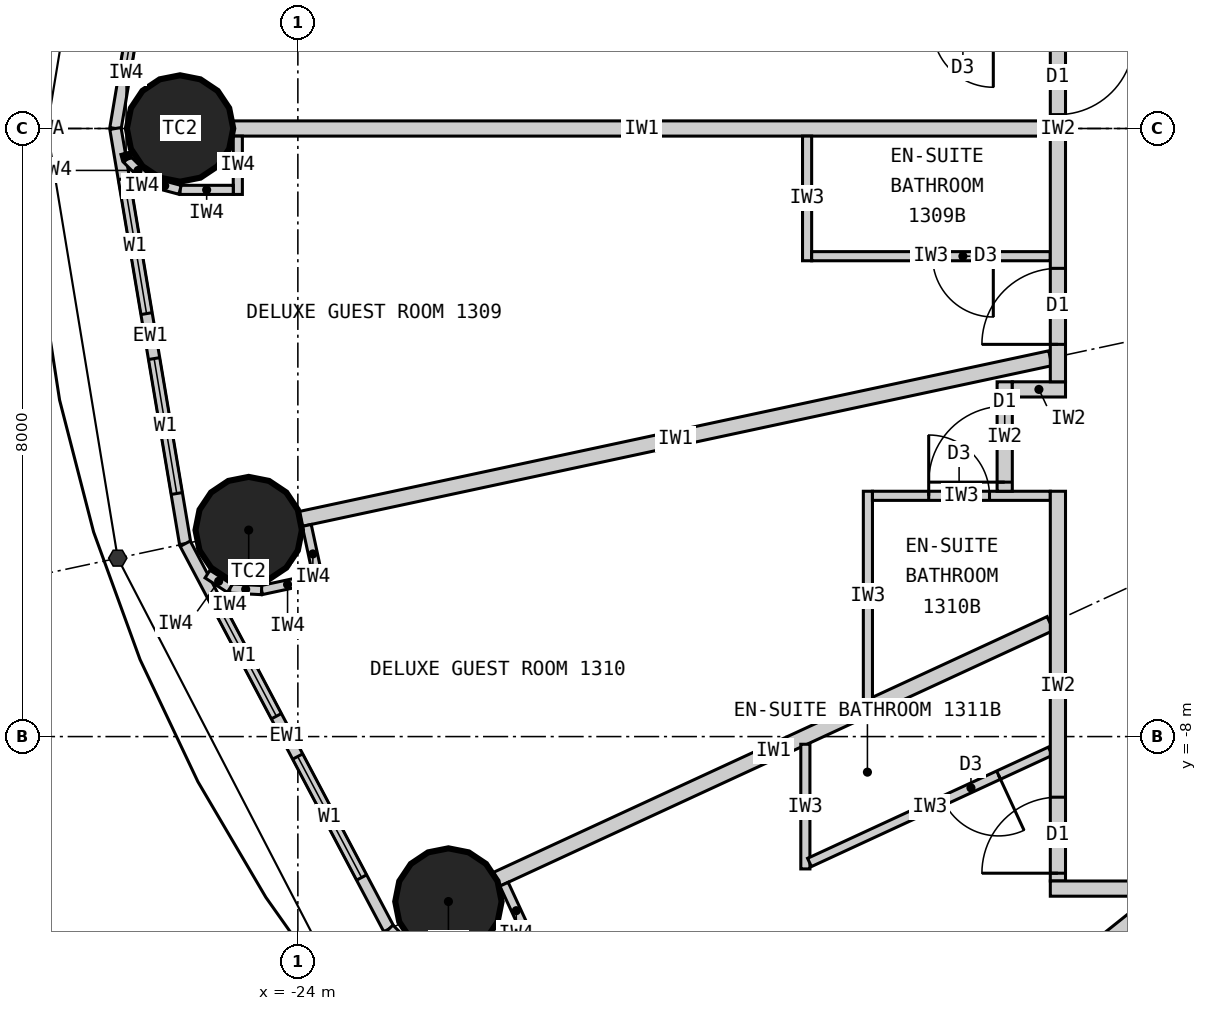
"""IFC4 building model, lengths in metres.
Left out: names, types, materials, properties, quantities, classifications, styles, units other than length and angle.
Written with IfcOpenShell. Run it as: python <this file> out.ifc"""

import sys

from ifc_helpers import new_model, si_unit, direction, frame, frame_2d, origin, origin_2d, place, context, subcontext, project, spatial, rectangle, circle, extrude, element, fill, save


model = new_model("IFC4")
c1 = context("Model", 3, precision=1e-05, world=origin(), true_north=direction((0.0, 1.0)))
c2 = subcontext(c1, "Body", "Model", "MODEL_VIEW")
j1 = project(units=[si_unit("LENGTHUNIT", "METRE"), si_unit("PLANEANGLEUNIT", "RADIAN")], contexts=[c1])
p1 = place(None, origin())
s1 = spatial("IfcSite", under=j1, at=p1, CompositionType="ELEMENT")
p2 = place(p1, origin())
s2 = spatial("IfcBuilding", under=s1, at=p2, CompositionType="ELEMENT")
p3 = place(p2, frame((0.0, 0.0, 57.3)))
s3 = spatial("IfcBuildingStorey", under=s2, at=p3, CompositionType="ELEMENT", Elevation=57.3)
for number, where, z_axis, x_axis in (
    (1, (-25.55, 0.0, 0.0), (0.0, 0.0, 1.0), (1.0, 0.0, 0.0)),
    (2, (-24.647, -5.283, 0.0), (0.0, 0.0, 1.0), (1.0, 0.0, 0.0)),
    (3, (-22.019, -10.17, 0.0), (0.0, 0.0, 1.0), (1.0, 0.0, 0.0)),
):
    element("IfcColumn", number, at=place(p3, frame(where, z_axis=z_axis, x_axis=x_axis)), inside=s3, PredefinedType="COLUMN", context=c2, shape_type="SweptSolid", body=[
        extrude(circle(Radius=0.7, at=origin_2d()), origin(), (0.0, 0.0, 1.0), 3.3),
    ])
p4 = place(p3, frame((-25.482, 5.462, 0.0), z_axis=(0.0, 0.0, 1.0), x_axis=(-0.165642551694, -0.986185857264, 0.0)))
e4 = element("IfcWall", 4, at=p4, inside=s3, PredefinedType="ELEMENTEDWALL", context=c2, shape_type="SweptSolid", body=[
    extrude(rectangle(XDim=5.539, YDim=0.15, at=frame_2d((2.77, 0.0))), origin(), (0.0, 0.0, 1.0), 3.12),
])
p5 = place(p4, frame((0.669, 0.0, 0.9)))
e5 = element("IfcOpeningElement", 5, at=p5, cuts=e4, PredefinedType="OPENING", context=c2, shape_type="SweptSolid", body=[
    extrude(rectangle(XDim=1.8, YDim=1.9, at=frame_2d((0.9, 0.95))), frame((0.0, 0.085, 0.0), z_axis=(0.0, -1.0, 0.0), x_axis=(1.0, 0.0, 0.0)), (0.0, 0.0, 1.0), 0.17),
])
p6 = place(p4, frame((3.07, 0.0, 0.9)))
e6 = element("IfcOpeningElement", 6, at=p6, cuts=e4, PredefinedType="OPENING", context=c2, shape_type="SweptSolid", body=[
    extrude(rectangle(XDim=1.8, YDim=1.9, at=frame_2d((0.9, 0.95))), frame((0.0, 0.085, 0.0), z_axis=(0.0, -1.0, 0.0), x_axis=(1.0, 0.0, 0.0)), (0.0, 0.0, 1.0), 0.17),
])
p7 = place(p3, frame((-26.4, 0.0, 0.0), z_axis=(0.0, 0.0, 1.0), x_axis=(0.165642551694, -0.986185857264, 0.0)))
e7 = element("IfcWall", 7, at=p7, inside=s3, PredefinedType="ELEMENTEDWALL", context=c2, shape_type="SweptSolid", body=[
    extrude(rectangle(XDim=5.539, YDim=0.15, at=frame_2d((2.77, 0.0))), origin(), (0.0, 0.0, 1.0), 3.12),
])
p8 = place(p7, frame((0.669, 0.0, 0.9)))
e8 = element("IfcOpeningElement", 8, at=p8, cuts=e7, PredefinedType="OPENING", context=c2, shape_type="SweptSolid", body=[
    extrude(rectangle(XDim=1.8, YDim=1.9, at=frame_2d((0.9, 0.95))), frame((0.0, 0.085, 0.0), z_axis=(0.0, -1.0, 0.0), x_axis=(1.0, 0.0, 0.0)), (0.0, 0.0, 1.0), 0.17),
])
p9 = place(p7, frame((3.07, 0.0, 0.9)))
e9 = element("IfcOpeningElement", 9, at=p9, cuts=e7, PredefinedType="OPENING", context=c2, shape_type="SweptSolid", body=[
    extrude(rectangle(XDim=1.8, YDim=1.9, at=frame_2d((0.9, 0.95))), frame((0.0, 0.085, 0.0), z_axis=(0.0, -1.0, 0.0), x_axis=(1.0, 0.0, 0.0)), (0.0, 0.0, 1.0), 0.17),
])
p10 = place(p3, frame((-25.482, -5.462, 0.0), z_axis=(0.0, 0.0, 1.0), x_axis=(0.467296867008, -0.884100468321, 0.0)))
e10 = element("IfcWall", 10, at=p10, inside=s3, PredefinedType="ELEMENTEDWALL", context=c2, shape_type="SweptSolid", body=[
    extrude(rectangle(XDim=5.734, YDim=0.15, at=frame_2d((2.867, 0.0))), origin(), (0.0, 0.0, 1.0), 3.12),
])
p11 = place(p10, frame((0.767, 0.0, 0.9)))
e11 = element("IfcOpeningElement", 11, at=p11, cuts=e10, PredefinedType="OPENING", context=c2, shape_type="SweptSolid", body=[
    extrude(rectangle(XDim=1.8, YDim=1.9, at=frame_2d((0.9, 0.95))), frame((0.0, 0.085, 0.0), z_axis=(0.0, -1.0, 0.0), x_axis=(1.0, 0.0, 0.0)), (0.0, 0.0, 1.0), 0.17),
])
p12 = place(p10, frame((3.167, 0.0, 0.9)))
e12 = element("IfcOpeningElement", 12, at=p12, cuts=e10, PredefinedType="OPENING", context=c2, shape_type="SweptSolid", body=[
    extrude(rectangle(XDim=1.8, YDim=1.9, at=frame_2d((0.9, 0.95))), frame((0.0, 0.085, 0.0), z_axis=(0.0, -1.0, 0.0), x_axis=(1.0, 0.0, 0.0)), (0.0, 0.0, 1.0), 0.17),
])
p13 = place(p3, frame((-22.803, -10.532, 0.0), z_axis=(0.0, 0.0, 1.0), x_axis=(0.699602905915, -0.714531856557, 0.0)))
e13 = element("IfcWall", 13, at=p13, inside=s3, PredefinedType="ELEMENTEDWALL", context=c2, shape_type="SweptSolid", body=[
    extrude(rectangle(XDim=6.051, YDim=0.15, at=frame_2d((3.025, 0.0))), origin(), (0.0, 0.0, 1.0), 3.12),
])
p14 = place(p13, frame((0.926, 0.0, 0.9)))
e14 = element("IfcOpeningElement", 14, at=p14, cuts=e13, PredefinedType="OPENING", context=c2, shape_type="SweptSolid", body=[
    extrude(rectangle(XDim=1.8, YDim=1.9, at=frame_2d((0.9, 0.95))), frame((0.0, 0.085, 0.0), z_axis=(0.0, -1.0, 0.0), x_axis=(1.0, 0.0, 0.0)), (0.0, 0.0, 1.0), 0.17),
])
p15 = place(p13, frame((3.325, 0.0, 0.9)))
e15 = element("IfcOpeningElement", 15, at=p15, cuts=e13, PredefinedType="OPENING", context=c2, shape_type="SweptSolid", body=[
    extrude(rectangle(XDim=1.8, YDim=1.9, at=frame_2d((0.9, 0.95))), frame((0.0, 0.085, 0.0), z_axis=(0.0, -1.0, 0.0), x_axis=(1.0, 0.0, 0.0)), (0.0, 0.0, 1.0), 0.17),
])
p16 = place(p3, frame((-14.1, 0.0, 0.0), z_axis=(0.0, 0.0, 1.0), x_axis=(-1.0, 0.0, 0.0)))
e16 = element("IfcWall", 16, at=p16, inside=s3, PredefinedType="PARTITIONING", context=c2, shape_type="SweptSolid", body=[
    extrude(rectangle(XDim=10.75, YDim=0.2, at=frame_2d((5.375, 0.0))), origin(), (0.0, 0.0, 1.0), 2.27),
])
p17 = place(p3, frame((-14.1, -3.022, 0.0), z_axis=(0.0, 0.0, 1.0), x_axis=(-0.977790014929, -0.209586943072, 0.0)))
e17 = element("IfcWall", 17, at=p17, inside=s3, PredefinedType="PARTITIONING", context=c2, shape_type="SweptSolid", body=[
    extrude(rectangle(XDim=10.087, YDim=0.2, at=frame_2d((5.043, 0.0))), origin(), (0.0, 0.0, 1.0), 2.32),
])
p18 = place(p3, frame((-14.1, -6.512, 0.0), z_axis=(0.0, 0.0, 1.0), x_axis=(-0.907832871056, -0.419332181247, 0.0)))
e18 = element("IfcWall", 18, at=p18, inside=s3, PredefinedType="PARTITIONING", context=c2, shape_type="SweptSolid", body=[
    extrude(rectangle(XDim=8.023, YDim=0.2, at=frame_2d((4.011, 0.0))), origin(), (0.0, 0.0, 1.0), 2.32),
])
p19 = place(p3, frame((-12.625, -10.1, 0.0), z_axis=(0.0, 0.0, 1.0), x_axis=(-0.780892451574, -0.624665493744, 0.0)))
e19 = element("IfcWall", 19, at=p19, inside=s3, PredefinedType="PARTITIONING", context=c2, shape_type="SweptSolid", body=[
    extrude(rectangle(XDim=6.045, YDim=0.2, at=frame_2d((3.022, 0.0))), origin(), (0.0, 0.0, 1.0), 2.32),
])
p20 = place(p3, frame((-17.3, -0.1, 0.0), z_axis=(0.0, 0.0, 1.0), x_axis=(0.0, -1.0, 0.0)))
e20 = element("IfcWall", 20, at=p20, inside=s3, PredefinedType="PARTITIONING", context=c2, shape_type="SweptSolid", body=[
    extrude(rectangle(XDim=1.64, YDim=0.12, at=frame_2d((0.82, 0.0))), origin(), (0.0, 0.0, 1.0), 3.12),
])
p21 = place(p3, frame((-14.1, -1.68, 0.0), z_axis=(0.0, 0.0, 1.0), x_axis=(-1.0, 0.0, 0.0)))
e21 = element("IfcWall", 21, at=p21, inside=s3, PredefinedType="PARTITIONING", context=c2, shape_type="SweptSolid", body=[
    extrude(rectangle(XDim=3.14, YDim=0.12, at=frame_2d((1.57, 0.0))), origin(), (0.0, 0.0, 1.0), 3.12),
])
p22 = place(p21, frame((0.75, 0.0, 0.0)))
e22 = element("IfcOpeningElement", 22, at=p22, cuts=e21, PredefinedType="OPENING", context=c2, shape_type="SweptSolid", body=[
    extrude(rectangle(XDim=0.8, YDim=2.1, at=frame_2d((0.4, 1.05))), frame((0.0, 0.07, 0.0), z_axis=(0.0, -1.0, 0.0), x_axis=(1.0, 0.0, 0.0)), (0.0, 0.0, 1.0), 0.14),
])
p23 = place(p3, frame((-16.5, -7.521, 0.0), z_axis=(0.0, 0.0, 1.0), x_axis=(0.0, 1.0, 0.0)))
e23 = element("IfcWall", 23, at=p23, inside=s3, PredefinedType="PARTITIONING", context=c2, shape_type="SweptSolid", body=[
    extrude(rectangle(XDim=2.749, YDim=0.12, at=frame_2d((1.374, 0.0))), origin(), (0.0, 0.0, 1.0), 3.12),
])
p24 = place(p3, frame((-14.1, -4.833, 0.0), z_axis=(0.0, 0.0, 1.0), x_axis=(-1.0, 0.0, 0.0)))
e24 = element("IfcWall", 24, at=p24, inside=s3, PredefinedType="PARTITIONING", context=c2, shape_type="SweptSolid", body=[
    extrude(rectangle(XDim=2.34, YDim=0.12, at=frame_2d((1.17, 0.0))), origin(), (0.0, 0.0, 1.0), 3.12),
])
p25 = place(p24, frame((0.8, 0.0, 0.0)))
e25 = element("IfcOpeningElement", 25, at=p25, cuts=e24, PredefinedType="OPENING", context=c2, shape_type="SweptSolid", body=[
    extrude(rectangle(XDim=0.8, YDim=2.1, at=frame_2d((0.4, 1.05))), frame((0.0, 0.07, 0.0), z_axis=(0.0, -1.0, 0.0), x_axis=(1.0, 0.0, 0.0)), (0.0, 0.0, 1.0), 0.14),
])
p26 = place(p3, frame((-17.323, -8.101, 0.0), z_axis=(0.0, 0.0, 1.0), x_axis=(0.0, -1.0, 0.0)))
e26 = element("IfcWall", 26, at=p26, inside=s3, PredefinedType="PARTITIONING", context=c2, shape_type="SweptSolid", body=[
    extrude(rectangle(XDim=1.64, YDim=0.12, at=frame_2d((0.82, 0.0))), origin(), (0.0, 0.0, 1.0), 3.12),
])
p27 = place(p3, frame((-14.1, -8.193, 0.0), z_axis=(0.0, 0.0, 1.0), x_axis=(-0.907836493557, -0.419324338628, 0.0)))
e27 = element("IfcWall", 27, at=p27, inside=s3, PredefinedType="PARTITIONING", context=c2, shape_type="SweptSolid", body=[
    extrude(rectangle(XDim=3.49, YDim=0.12, at=frame_2d((1.745, 0.0))), origin(), (0.0, 0.0, 1.0), 3.12),
])
p28 = place(p27, frame((0.75, 0.0, 0.0)))
e28 = element("IfcOpeningElement", 28, at=p28, cuts=e27, PredefinedType="OPENING", context=c2, shape_type="SweptSolid", body=[
    extrude(rectangle(XDim=0.8, YDim=2.1, at=frame_2d((0.4, 1.05))), frame((0.0, 0.07, 0.0), z_axis=(0.0, -1.0, 0.0), x_axis=(1.0, 0.0, 0.0)), (0.0, 0.0, 1.0), 0.14),
])
p29 = place(p3, frame((-14.7, -3.333, 0.0), z_axis=(0.0, 0.0, 1.0), x_axis=(0.0, -1.0, 0.0)))
e29 = element("IfcWall", 29, at=p29, inside=s3, PredefinedType="PARTITIONING", context=c2, shape_type="SweptSolid", body=[
    extrude(rectangle(XDim=1.44, YDim=0.2, at=frame_2d((0.72, 0.0))), origin(), (0.0, 0.0, 1.0), 3.12),
])
p30 = place(p29, frame((0.32, 0.0, 0.0)))
e30 = element("IfcOpeningElement", 30, at=p30, cuts=e29, PredefinedType="OPENING", context=c2, shape_type="SweptSolid", body=[
    extrude(rectangle(XDim=1.0, YDim=2.2, at=frame_2d((0.5, 1.1))), frame((0.0, 0.11, 0.0), z_axis=(0.0, -1.0, 0.0), x_axis=(1.0, 0.0, 0.0)), (0.0, 0.0, 1.0), 0.22),
])
p31 = place(p3, frame((-13.9, -3.433, 0.0), z_axis=(0.0, 0.0, 1.0), x_axis=(-1.0, 0.0, 0.0)))
e31 = element("IfcWall", 31, at=p31, inside=s3, PredefinedType="PARTITIONING", context=c2, shape_type="SweptSolid", body=[
    extrude(rectangle(XDim=0.7, YDim=0.2, at=frame_2d((0.35, 0.0))), origin(), (0.0, 0.0, 1.0), 2.32),
])
p32 = place(p3, frame((-14.0, 3.333, 0.0), z_axis=(0.0, 0.0, 1.0), x_axis=(0.0, -1.0, 0.0)))
e32 = element("IfcWall", 32, at=p32, inside=s3, PredefinedType="PARTITIONING", context=c2, shape_type="SweptSolid", body=[
    extrude(rectangle(XDim=6.665, YDim=0.2, at=frame_2d((3.333, 0.0))), origin(), (0.0, 0.0, 1.0), 3.12),
])
p33 = place(p32, frame((2.15, 0.0, 0.0)))
e33 = element("IfcOpeningElement", 33, at=p33, cuts=e32, PredefinedType="OPENING", context=c2, shape_type="SweptSolid", body=[
    extrude(rectangle(XDim=1.0, YDim=2.2, at=frame_2d((0.5, 1.1))), frame((0.0, 0.11, 0.0), z_axis=(0.0, -1.0, 0.0), x_axis=(1.0, 0.0, 0.0)), (0.0, 0.0, 1.0), 0.22),
])
p34 = place(p32, frame((5.173, 0.0, 0.0)))
e34 = element("IfcOpeningElement", 34, at=p34, cuts=e32, PredefinedType="OPENING", context=c2, shape_type="SweptSolid", body=[
    extrude(rectangle(XDim=1.0, YDim=2.2, at=frame_2d((0.5, 1.1))), frame((0.0, 0.11, 0.0), z_axis=(0.0, -1.0, 0.0), x_axis=(1.0, 0.0, 0.0)), (0.0, 0.0, 1.0), 0.22),
])
p35 = place(p3, frame((-14.0, -4.772, 0.0), z_axis=(0.0, 0.0, 1.0), x_axis=(0.0, -1.0, 0.0)))
e35 = element("IfcWall", 35, at=p35, inside=s3, PredefinedType="PARTITIONING", context=c2, shape_type="SweptSolid", body=[
    extrude(rectangle(XDim=5.127, YDim=0.2, at=frame_2d((2.564, 0.0))), origin(), (0.0, 0.0, 1.0), 3.12),
])
p36 = place(p35, frame((4.025, 0.0, 0.0)))
e36 = element("IfcOpeningElement", 36, at=p36, cuts=e35, PredefinedType="OPENING", context=c2, shape_type="SweptSolid", body=[
    extrude(rectangle(XDim=1.0, YDim=2.2, at=frame_2d((0.5, 1.1))), frame((0.0, 0.11, 0.0), z_axis=(0.0, -1.0, 0.0), x_axis=(1.0, 0.0, 0.0)), (0.0, 0.0, 1.0), 0.22),
])
p37 = place(p3, frame((-10.885, -10.0, 0.0), z_axis=(0.0, 0.0, 1.0), x_axis=(-1.0, 0.0, 0.0)))
e37 = element("IfcWall", 37, at=p37, inside=s3, PredefinedType="PARTITIONING", context=c2, shape_type="SweptSolid", body=[
    extrude(rectangle(XDim=3.215, YDim=0.2, at=frame_2d((1.607, 0.0))), origin(), (0.0, 0.0, 1.0), 3.12),
])
p38 = place(p3, frame((-24.79, -0.1, 0.0), z_axis=(0.0, 0.0, 1.0), x_axis=(0.0, -1.0, 0.0)))
e38 = element("IfcWall", 38, at=p38, inside=s3, PredefinedType="PARTITIONING", context=c2, shape_type="SweptSolid", body=[
    extrude(rectangle(XDim=0.767, YDim=0.12, at=frame_2d((0.384, 0.0))), origin(), (0.0, 0.0, 1.0), 3.12),
])
p39 = place(p3, frame((-24.85, -0.808, 0.0), z_axis=(0.0, 0.0, 1.0), x_axis=(-1.0, 0.0, 0.0)))
e39 = element("IfcWall", 39, at=p39, inside=s3, PredefinedType="PARTITIONING", context=c2, shape_type="SweptSolid", body=[
    extrude(rectangle(XDim=0.7, YDim=0.12, at=frame_2d((0.35, 0.0))), origin(), (0.0, 0.0, 1.0), 3.12),
])
p40 = place(p3, frame((-25.55, -0.808, 0.0), z_axis=(0.0, 0.0, 1.0), x_axis=(-0.965807183573, 0.2592614205, 0.0)))
e40 = element("IfcWall", 40, at=p40, inside=s3, PredefinedType="PARTITIONING", context=c2, shape_type="SweptSolid", body=[
    extrude(rectangle(XDim=0.418, YDim=0.12, at=frame_2d((0.209, 0.0))), origin(), (0.0, 0.0, 1.0), 3.12),
])
p41 = place(p3, frame((-25.954, -0.699, 0.0), z_axis=(0.0, 0.0, 1.0), x_axis=(-0.707106781187, 0.707106781187, 0.0)))
e41 = element("IfcWall", 41, at=p41, inside=s3, PredefinedType="PARTITIONING", context=c2, shape_type="SweptSolid", body=[
    extrude(rectangle(XDim=0.418, YDim=0.12, at=frame_2d((0.209, 0.0))), origin(), (0.0, 0.0, 1.0), 3.12),
])
p42 = place(p3, frame((-26.249, -0.404, 0.0), z_axis=(0.0, 0.0, 1.0), x_axis=(-0.259754282609, 0.965674744759, 0.0)))
e42 = element("IfcWall", 42, at=p42, inside=s3, PredefinedType="PARTITIONING", context=c2, shape_type="SweptSolid", body=[
    extrude(rectangle(XDim=0.08, YDim=0.12, at=frame_2d((0.04, 0.0))), origin(), (0.0, 0.0, 1.0), 3.12),
])
p43 = place(p3, frame((-23.883, -5.222, 0.0), z_axis=(0.0, 0.0, 1.0), x_axis=(0.209311842415, -0.977848941619, 0.0)))
e43 = element("IfcWall", 43, at=p43, inside=s3, PredefinedType="PARTITIONING", context=c2, shape_type="SweptSolid", body=[
    extrude(rectangle(XDim=0.768, YDim=0.12, at=frame_2d((0.384, 0.0))), origin(), (0.0, 0.0, 1.0), 3.12),
])
p44 = place(p3, frame((-23.793, -5.926, 0.0), z_axis=(0.0, 0.0, 1.0), x_axis=(-0.977792206673, -0.209576717621, 0.0)))
e44 = element("IfcWall", 44, at=p44, inside=s3, PredefinedType="PARTITIONING", context=c2, shape_type="SweptSolid", body=[
    extrude(rectangle(XDim=0.7, YDim=0.12, at=frame_2d((0.35, 0.0))), origin(), (0.0, 0.0, 1.0), 3.12),
])
p45 = place(p3, frame((-24.478, -6.073, 0.0), z_axis=(0.0, 0.0, 1.0), x_axis=(-0.998708262812, 0.05081147302, 0.0)))
e45 = element("IfcWall", 45, at=p45, inside=s3, PredefinedType="PARTITIONING", context=c2, shape_type="SweptSolid", body=[
    extrude(rectangle(XDim=0.418, YDim=0.12, at=frame_2d((0.209, 0.0))), origin(), (0.0, 0.0, 1.0), 3.12),
])
p46 = place(p3, frame((-24.895, -6.052, 0.0), z_axis=(0.0, 0.0, 1.0), x_axis=(-0.839495197275, 0.54336710772, 0.0)))
e46 = element("IfcWall", 46, at=p46, inside=s3, PredefinedType="PARTITIONING", context=c2, shape_type="SweptSolid", body=[
    extrude(rectangle(XDim=0.35, YDim=0.12, at=frame_2d((0.175, 0.0))), origin(), (0.0, 0.0, 1.0), 3.12),
])
p47 = place(p3, frame((-21.287, -9.942, 0.0), z_axis=(0.0, 0.0, 1.0), x_axis=(0.419259891039, -0.907866258744, 0.0)))
e47 = element("IfcWall", 47, at=p47, inside=s3, PredefinedType="PARTITIONING", context=c2, shape_type="SweptSolid", body=[
    extrude(rectangle(XDim=0.768, YDim=0.12, at=frame_2d((0.384, 0.0))), origin(), (0.0, 0.0, 1.0), 3.12),
])
p48 = place(p3, frame((-21.045, -10.61, 0.0), z_axis=(0.0, 0.0, 1.0), x_axis=(-0.907877701396, -0.419235112208, 0.0)))
e48 = element("IfcWall", 48, at=p48, inside=s3, PredefinedType="PARTITIONING", context=c2, shape_type="SweptSolid", body=[
    extrude(rectangle(XDim=0.7, YDim=0.12, at=frame_2d((0.35, 0.0))), origin(), (0.0, 0.0, 1.0), 3.12),
])
p49 = place(p6, origin())
e49 = element("IfcWindow", 49, at=p49, inside=s3, PartitioningType="SINGLE_PANEL", PredefinedType="WINDOW", context=c2, shape_type="SweptSolid", body=[
    extrude(rectangle(XDim=1.8, YDim=1.9, at=frame_2d((0.9, 0.95))), frame((0.0, 0.03, 0.0), z_axis=(0.0, -1.0, 0.0), x_axis=(1.0, 0.0, 0.0)), (0.0, 0.0, 1.0), 0.06),
])
fill(e6, e49)
p50 = place(p8, origin())
e50 = element("IfcWindow", 50, at=p50, inside=s3, PartitioningType="SINGLE_PANEL", PredefinedType="WINDOW", context=c2, shape_type="SweptSolid", body=[
    extrude(rectangle(XDim=1.8, YDim=1.9, at=frame_2d((0.9, 0.95))), frame((0.0, 0.03, 0.0), z_axis=(0.0, -1.0, 0.0), x_axis=(1.0, 0.0, 0.0)), (0.0, 0.0, 1.0), 0.06),
])
fill(e8, e50)
p51 = place(p9, origin())
e51 = element("IfcWindow", 51, at=p51, inside=s3, PartitioningType="SINGLE_PANEL", PredefinedType="WINDOW", context=c2, shape_type="SweptSolid", body=[
    extrude(rectangle(XDim=1.8, YDim=1.9, at=frame_2d((0.9, 0.95))), frame((0.0, 0.03, 0.0), z_axis=(0.0, -1.0, 0.0), x_axis=(1.0, 0.0, 0.0)), (0.0, 0.0, 1.0), 0.06),
])
fill(e9, e51)
p52 = place(p11, origin())
e52 = element("IfcWindow", 52, at=p52, inside=s3, PartitioningType="SINGLE_PANEL", PredefinedType="WINDOW", context=c2, shape_type="SweptSolid", body=[
    extrude(rectangle(XDim=1.8, YDim=1.9, at=frame_2d((0.9, 0.95))), frame((0.0, 0.03, 0.0), z_axis=(0.0, -1.0, 0.0), x_axis=(1.0, 0.0, 0.0)), (0.0, 0.0, 1.0), 0.06),
])
fill(e11, e52)
p53 = place(p12, origin())
e53 = element("IfcWindow", 53, at=p53, inside=s3, PartitioningType="SINGLE_PANEL", PredefinedType="WINDOW", context=c2, shape_type="SweptSolid", body=[
    extrude(rectangle(XDim=1.8, YDim=1.9, at=frame_2d((0.9, 0.95))), frame((0.0, 0.03, 0.0), z_axis=(0.0, -1.0, 0.0), x_axis=(1.0, 0.0, 0.0)), (0.0, 0.0, 1.0), 0.06),
])
fill(e12, e53)
p54 = place(p33, origin())
e54 = element("IfcDoor", 54, at=p54, inside=s3, OperationType="SINGLE_SWING_LEFT", PredefinedType="DOOR", context=c2, shape_type="SweptSolid", body=[
    extrude(rectangle(XDim=1.0, YDim=2.2, at=frame_2d((0.5, 1.1))), frame((0.0, 0.025, 0.0), z_axis=(0.0, -1.0, 0.0), x_axis=(1.0, 0.0, 0.0)), (0.0, 0.0, 1.0), 0.05),
])
fill(e33, e54)
p55 = place(p22, origin())
e55 = element("IfcDoor", 55, at=p55, inside=s3, OperationType="SINGLE_SWING_LEFT", PredefinedType="DOOR", context=c2, shape_type="SweptSolid", body=[
    extrude(rectangle(XDim=0.8, YDim=2.1, at=frame_2d((0.4, 1.05))), frame((0.0, 0.025, 0.0), z_axis=(0.0, -1.0, 0.0), x_axis=(1.0, 0.0, 0.0)), (0.0, 0.0, 1.0), 0.05),
])
fill(e22, e55)
p56 = place(p34, origin())
e56 = element("IfcDoor", 56, at=p56, inside=s3, OperationType="SINGLE_SWING_RIGHT", PredefinedType="DOOR", context=c2, shape_type="SweptSolid", body=[
    extrude(rectangle(XDim=1.0, YDim=2.2, at=frame_2d((0.5, 1.1))), frame((0.0, 0.025, 0.0), z_axis=(0.0, -1.0, 0.0), x_axis=(1.0, 0.0, 0.0)), (0.0, 0.0, 1.0), 0.05),
])
fill(e34, e56)
p57 = place(p25, origin())
e57 = element("IfcDoor", 57, at=p57, inside=s3, OperationType="SINGLE_SWING_RIGHT", PredefinedType="DOOR", context=c2, shape_type="SweptSolid", body=[
    extrude(rectangle(XDim=0.8, YDim=2.1, at=frame_2d((0.4, 1.05))), frame((0.0, 0.025, 0.0), z_axis=(0.0, -1.0, 0.0), x_axis=(1.0, 0.0, 0.0)), (0.0, 0.0, 1.0), 0.05),
])
fill(e25, e57)
p58 = place(p30, origin())
e58 = element("IfcDoor", 58, at=p58, inside=s3, OperationType="SINGLE_SWING_RIGHT", PredefinedType="DOOR", context=c2, shape_type="SweptSolid", body=[
    extrude(rectangle(XDim=1.0, YDim=2.2, at=frame_2d((0.5, 1.1))), frame((0.0, 0.025, 0.0), z_axis=(0.0, -1.0, 0.0), x_axis=(1.0, 0.0, 0.0)), (0.0, 0.0, 1.0), 0.05),
])
fill(e30, e58)
p59 = place(p28, origin())
e59 = element("IfcDoor", 59, at=p59, inside=s3, OperationType="SINGLE_SWING_LEFT", PredefinedType="DOOR", context=c2, shape_type="SweptSolid", body=[
    extrude(rectangle(XDim=0.8, YDim=2.1, at=frame_2d((0.4, 1.05))), frame((0.0, 0.025, 0.0), z_axis=(0.0, -1.0, 0.0), x_axis=(1.0, 0.0, 0.0)), (0.0, 0.0, 1.0), 0.05),
])
fill(e28, e59)
p60 = place(p36, origin())
e60 = element("IfcDoor", 60, at=p60, inside=s3, OperationType="SINGLE_SWING_RIGHT", PredefinedType="DOOR", context=c2, shape_type="SweptSolid", body=[
    extrude(rectangle(XDim=1.0, YDim=2.2, at=frame_2d((0.5, 1.1))), frame((0.0, 0.025, 0.0), z_axis=(0.0, -1.0, 0.0), x_axis=(1.0, 0.0, 0.0)), (0.0, 0.0, 1.0), 0.05),
])
fill(e36, e60)
save(model, sys.argv[1])
